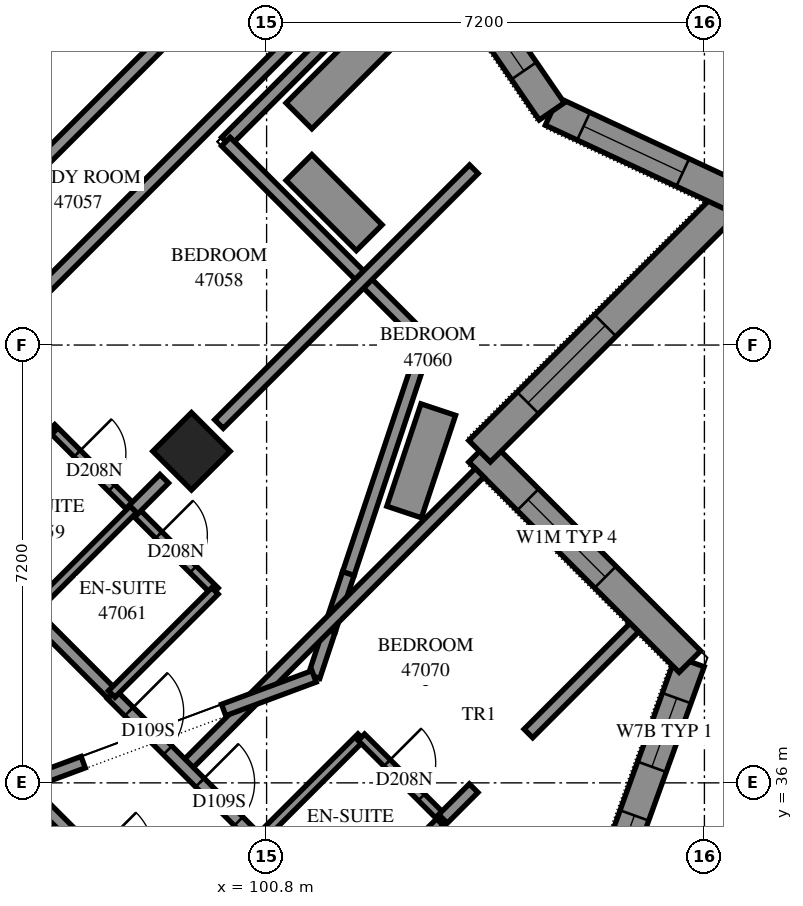
"""IFC4 building model, lengths in metres.
Left out: names, types, materials, properties, quantities, classifications, styles, units other than length and angle.
Written with IfcOpenShell. Run it as: python <this file> out.ifc"""

import sys

from ifc_helpers import new_model, si_unit, direction, frame, frame_2d, origin, origin_2d, place, context, subcontext, project, spatial, polyline, rectangle, outline, extrude, element, fill, save


model = new_model("IFC4")
c1 = context("Model", 3, precision=1e-05, world=origin(), true_north=direction((0.0, 1.0)))
c2 = subcontext(c1, "Body", "Model", "MODEL_VIEW")
j1 = project(units=[si_unit("LENGTHUNIT", "METRE"), si_unit("PLANEANGLEUNIT", "RADIAN")], contexts=[c1])
p1 = place(None, origin())
s1 = spatial("IfcSite", under=j1, at=p1, CompositionType="ELEMENT")
p2 = place(p1, origin())
s2 = spatial("IfcBuilding", under=s1, at=p2, CompositionType="ELEMENT")
p3 = place(p2, frame((0.0, 0.0, 172.8)))
s3 = spatial("IfcBuildingStorey", under=s2, at=p3, CompositionType="ELEMENT", Elevation=172.8)
p4 = place(p3, frame((99.565, 41.453, 0.0), z_axis=(0.0, 0.0, 1.0), x_axis=(0.7071067812, -0.7071067812, 0.0)))
e1 = element("IfcColumn", 1, at=p4, inside=s3, PredefinedType="COLUMN", context=c2, shape_type="SweptSolid", body=[
    extrude(rectangle(XDim=0.9, YDim=0.9, at=origin_2d()), origin(), (0.0, 0.0, 1.0), 3.1),
])
p5 = place(p3, frame((87.049, 38.695, -0.3), z_axis=(0.0, 0.0, 1.0), x_axis=(0.7071067812, 0.7071067812, 0.0)))
e2 = element("IfcWall", 2, at=p5, inside=s3, PredefinedType="SHEAR", context=c2, shape_type="SweptSolid", body=[
    extrude(rectangle(XDim=14.4, YDim=0.6, at=frame_2d((7.2, 0.0))), origin(), (0.0, 0.0, 1.0), 2.7),
])
p6 = place(p5, frame((4.55, 0.0, 0.3)))
e3 = element("IfcOpeningElement", 3, at=p6, cuts=e2, PredefinedType="OPENING", context=c2, shape_type="SweptSolid", body=[
    extrude(rectangle(XDim=1.1, YDim=2.1, at=frame_2d((0.55, 1.05))), frame((0.0, 0.31, 0.0), z_axis=(0.0, -1.0, 0.0), x_axis=(1.0, 0.0, 0.0)), (0.0, 0.0, 1.0), 0.62),
])
p7 = place(p5, frame((11.35, 0.0, 0.3)))
e4 = element("IfcOpeningElement", 4, at=p7, cuts=e2, PredefinedType="OPENING", context=c2, shape_type="SweptSolid", body=[
    extrude(rectangle(XDim=1.1, YDim=2.1, at=frame_2d((0.55, 1.05))), frame((0.0, 0.31, 0.0), z_axis=(0.0, -1.0, 0.0), x_axis=(1.0, 0.0, 0.0)), (0.0, 0.0, 1.0), 0.62),
])
p8 = place(p3, frame((105.939, 32.941, 0.0), z_axis=(0.0, 0.0, 1.0), x_axis=(0.3392592753, 0.9406929064, 0.0)))
e5 = element("IfcWall", 5, at=p8, inside=s3, PredefinedType="SOLIDWALL", context=c2, shape_type="SweptSolid", body=[
    extrude(outline(polyline([(-0.113, -0.25), (5.531, -0.25), (5.213, 0.25), (0.113, 0.25), (-0.113, -0.25)])), origin(), (0.0, 0.0, 1.0), 3.1),
])
p9 = place(p8, frame((0.882, 0.0, 0.7)))
e6 = element("IfcOpeningElement", 6, at=p9, cuts=e5, PredefinedType="OPENING", context=c2, shape_type="SweptSolid", body=[
    extrude(rectangle(XDim=1.8, YDim=2.1, at=frame_2d((0.9, 1.05))), frame((0.0, 0.26, 0.0), z_axis=(0.0, -1.0, 0.0), x_axis=(1.0, 0.0, 0.0)), (0.0, 0.0, 1.0), 0.52),
])
p10 = place(p8, frame((3.533, 0.0, 0.7)))
e7 = element("IfcOpeningElement", 7, at=p10, cuts=e5, PredefinedType="OPENING", context=c2, shape_type="SweptSolid", body=[
    extrude(rectangle(XDim=1.2, YDim=2.1, at=frame_2d((0.6, 1.05))), frame((0.0, 0.26, 0.0), z_axis=(0.0, -1.0, 0.0), x_axis=(1.0, 0.0, 0.0)), (0.0, 0.0, 1.0), 0.52),
])
p11 = place(p3, frame((107.761, 37.994, 0.0), z_axis=(0.0, 0.0, 1.0), x_axis=(-0.7071272252, 0.7070863366, 0.0)))
e8 = element("IfcWall", 8, at=p11, inside=s3, PredefinedType="SOLIDWALL", context=c2, shape_type="SweptSolid", body=[
    extrude(outline(polyline([(-0.159, -0.25), (4.641, -0.25), (5.141, 0.25), (0.159, 0.25), (-0.159, -0.25)])), origin(), (0.0, 0.0, 1.0), 3.1),
])
p12 = place(p11, frame((1.966, 0.0, 0.7)))
e9 = element("IfcOpeningElement", 9, at=p12, cuts=e8, PredefinedType="OPENING", context=c2, shape_type="SweptSolid", body=[
    extrude(rectangle(XDim=1.8, YDim=1.8, at=frame_2d((0.9, 0.9))), frame((0.0, 0.26, 0.0), z_axis=(0.0, -1.0, 0.0), x_axis=(1.0, 0.0, 0.0)), (0.0, 0.0, 1.0), 0.52),
])
p13 = place(p3, frame((104.302, 41.453, 0.0), z_axis=(0.0, 0.0, 1.0), x_axis=(0.7071152225, 0.7070983398, 0.0)))
e10 = element("IfcWall", 10, at=p13, inside=s3, PredefinedType="SOLIDWALL", context=c2, shape_type="SweptSolid", body=[
    extrude(outline(polyline([(0.25, -0.25), (6.28, -0.25), (5.566, 0.25), (-0.25, 0.25), (0.25, -0.25)])), origin(), (0.0, 0.0, 1.0), 3.1),
])
p14 = place(p13, frame((1.125, 0.0, 0.7)))
e11 = element("IfcOpeningElement", 11, at=p14, cuts=e10, PredefinedType="OPENING", context=c2, shape_type="SweptSolid", body=[
    extrude(rectangle(XDim=1.8, YDim=1.8, at=frame_2d((0.9, 0.9))), frame((0.0, 0.26, 0.0), z_axis=(0.0, -1.0, 0.0), x_axis=(1.0, 0.0, 0.0)), (0.0, 0.0, 1.0), 0.52),
])
p15 = place(p3, frame((108.491, 45.641, 0.0), z_axis=(0.0, 0.0, 1.0), x_axis=(-0.9061206526, 0.4230193411, 0.0)))
e12 = element("IfcWall", 12, at=p15, inside=s3, PredefinedType="SOLIDWALL", context=c2, shape_type="SweptSolid", body=[
    extrude(outline(polyline([(-0.357, -0.25), (3.244, -0.25), (3.38, 0.25), (0.357, 0.25), (-0.357, -0.25)])), origin(), (0.0, 0.0, 1.0), 3.1),
])
p16 = place(p15, frame((0.934, 0.0, 0.7)))
e13 = element("IfcOpeningElement", 13, at=p16, cuts=e12, PredefinedType="OPENING", context=c2, shape_type="SweptSolid", body=[
    extrude(rectangle(XDim=1.8, YDim=1.8, at=frame_2d((0.9, 0.9))), frame((0.0, 0.26, 0.0), z_axis=(0.0, -1.0, 0.0), x_axis=(1.0, 0.0, 0.0)), (0.0, 0.0, 1.0), 0.52),
])
p17 = place(p3, frame((105.489, 47.042, 0.0), z_axis=(0.0, 0.0, 1.0), x_axis=(-0.5657493712, 0.8245772547, 0.0)))
e14 = element("IfcWall", 14, at=p17, inside=s3, PredefinedType="SOLIDWALL", context=c2, shape_type="SweptSolid", body=[
    extrude(outline(polyline([(0.068, -0.25), (3.511, -0.25), (3.417, 0.25), (-0.068, 0.25), (0.068, -0.25)])), origin(), (0.0, 0.0, 1.0), 3.1),
])
p18 = place(p17, frame((0.809, 0.0, 0.7)))
e15 = element("IfcOpeningElement", 15, at=p18, cuts=e14, PredefinedType="OPENING", context=c2, shape_type="SweptSolid", body=[
    extrude(rectangle(XDim=1.8, YDim=1.8, at=frame_2d((0.9, 0.9))), frame((0.0, 0.26, 0.0), z_axis=(0.0, -1.0, 0.0), x_axis=(1.0, 0.0, 0.0)), (0.0, 0.0, 1.0), 0.52),
])
p19 = place(p3, frame((103.323, 49.737, 0.0), z_axis=(0.0, 0.0, 1.0), x_axis=(-0.707117854, -0.7070957082, 0.0)))
e16 = element("IfcWall", 16, at=p19, inside=s3, PredefinedType="PARAPET", context=c2, shape_type="SweptSolid", body=[
    extrude(outline(polyline([(0.0, -0.1), (4.615, -0.1), (4.415, 0.1), (0.0, 0.1), (0.0, -0.1)])), origin(), (0.0, 0.0, 1.0), 0.25),
])
p20 = place(p3, frame((100.13, 46.544, 0.0), z_axis=(0.0, 0.0, 1.0), x_axis=(0.7070852627, -0.707128299, 0.0)))
e17 = element("IfcWall", 17, at=p20, inside=s3, PredefinedType="PARAPET", context=c2, shape_type="SweptSolid", body=[
    extrude(outline(polyline([(-0.1, -0.1), (4.585, -0.1), (4.709, 0.1), (0.1, 0.1), (-0.1, -0.1)])), origin(), (0.0, 0.0, 1.0), 0.25),
])
p21 = place(p3, frame((103.416, 43.258, 0.0), z_axis=(0.0, 0.0, 1.0), x_axis=(-0.3160011426, -0.9487588091, 0.0)))
e18 = element("IfcWall", 18, at=p21, inside=s3, PredefinedType="PARAPET", context=c2, shape_type="SweptSolid", body=[
    extrude(outline(polyline([(0.062, -0.1), (0.397, -0.1), (0.397, 0.1), (-0.062, 0.1), (0.062, -0.1)])), origin(), (0.0, 0.0, 1.0), 0.25),
])
p22 = place(p3, frame((103.291, 42.881, 0.0), z_axis=(0.0, 0.0, 1.0), x_axis=(-0.3162443117, -0.9486777827, 0.0)))
e19 = element("IfcWall", 19, at=p22, inside=s3, PredefinedType="PARAPET", context=c2, shape_type="SweptSolid", body=[
    extrude(outline(polyline([(0.0, -0.1), (3.626, -0.1), (3.626, 0.1), (0.0, 0.1), (0.0, -0.1)])), origin(), (0.0, 0.0, 1.0), 0.25),
])
p23 = place(p3, frame((102.144, 39.441, 0.0), z_axis=(0.0, 0.0, 1.0), x_axis=(-0.3161671582, -0.9487034985, 0.0)))
e20 = element("IfcWall", 20, at=p23, inside=s3, PredefinedType="PARAPET", context=c2, shape_type="SweptSolid", body=[
    extrude(outline(polyline([(0.0, -0.1), (0.99, -0.1), (0.99, 0.1), (0.0, 0.1), (0.0, -0.1)])), origin(), (0.0, 0.0, 1.0), 0.25),
])
p24 = place(p3, frame((101.831, 38.502, 0.0), z_axis=(0.0, 0.0, 1.0), x_axis=(-0.3163035263, -0.9486580413, 0.0)))
e21 = element("IfcWall", 21, at=p24, inside=s3, PredefinedType="PARAPET", context=c2, shape_type="SweptSolid", body=[
    extrude(outline(polyline([(0.0, -0.1), (0.744, -0.1), (0.84, 0.1), (0.0, 0.1), (0.0, -0.1)])), origin(), (0.0, 0.0, 1.0), 0.25),
])
p25 = place(p3, frame((101.332, 46.12, 0.0), z_axis=(0.0, 0.0, 1.0), x_axis=(0.7070761738, -0.7071373872, 0.0)))
e22 = element("IfcWall", 22, at=p25, inside=s3, PredefinedType="SOLIDWALL", context=c2, shape_type="SweptSolid", body=[
    extrude(rectangle(XDim=1.634, YDim=0.6, at=frame_2d((0.817, 0.0))), origin(), (0.0, 0.0, 1.0), 0.65),
])
p26 = place(p3, frame((103.623, 42.138, 0.0), z_axis=(0.0, 0.0, 1.0), x_axis=(-0.3162446684, -0.9486776638, 0.0)))
e23 = element("IfcWall", 23, at=p26, inside=s3, PredefinedType="SOLIDWALL", context=c2, shape_type="SweptSolid", body=[
    extrude(rectangle(XDim=1.775, YDim=0.6, at=frame_2d((0.887, 0.0))), origin(), (0.0, 0.0, 1.0), 0.65),
])
p27 = place(p3, frame((94.366, 41.348, 0.0), z_axis=(0.0, 0.0, 1.0), x_axis=(0.7071108825, 0.7071026798, 0.0)))
e24 = element("IfcWall", 24, at=p27, inside=s3, PredefinedType="PARTITIONING", context=c2, shape_type="SweptSolid", body=[
    extrude(rectangle(XDim=12.191, YDim=0.2, at=frame_2d((6.096, 0.0))), origin(), (0.0, 0.0, 1.0), 3.1),
])
p28 = place(p3, frame((91.967, 40.785, 0.0), z_axis=(0.0, 0.0, 1.0), x_axis=(0.7071067812, -0.7071067812, 0.0)))
e25 = element("IfcWall", 25, at=p28, inside=s3, PredefinedType="PARTITIONING", context=c2, shape_type="SweptSolid", body=[
    extrude(rectangle(XDim=12.1, YDim=0.2, at=frame_2d((6.05, 0.0))), origin(), (0.0, 0.0, 1.0), 3.1),
])
p29 = place(p28, frame((3.448, 0.0, 0.0)))
e26 = element("IfcOpeningElement", 26, at=p29, cuts=e25, PredefinedType="OPENING", context=c2, shape_type="SweptSolid", body=[
    extrude(rectangle(XDim=0.9, YDim=2.1, at=frame_2d((0.45, 1.05))), frame((0.0, 0.11, 0.0), z_axis=(0.0, -1.0, 0.0), x_axis=(1.0, 0.0, 0.0)), (0.0, 0.0, 1.0), 0.22),
])
p30 = place(p28, frame((8.457, 0.0, 0.0)))
e27 = element("IfcOpeningElement", 27, at=p30, cuts=e25, PredefinedType="OPENING", context=c2, shape_type="SweptSolid", body=[
    extrude(rectangle(XDim=1.0, YDim=2.1, at=frame_2d((0.5, 1.05))), frame((0.0, 0.11, 0.0), z_axis=(0.0, -1.0, 0.0), x_axis=(1.0, 0.0, 0.0)), (0.0, 0.0, 1.0), 0.22),
])
p31 = place(p3, frame((93.306, 42.408, 0.0), z_axis=(0.0, 0.0, 1.0), x_axis=(0.7071067812, 0.7071067812, 0.0)))
e28 = element("IfcWall", 28, at=p31, inside=s3, PredefinedType="PARTITIONING", context=c2, shape_type="SweptSolid", body=[
    extrude(rectangle(XDim=9.45, YDim=0.2, at=frame_2d((4.725, 0.0))), origin(), (0.0, 0.0, 1.0), 3.1),
])
p32 = place(p31, frame((0.253, 0.0, 0.0)))
e29 = element("IfcOpeningElement", 29, at=p32, cuts=e28, PredefinedType="OPENING", context=c2, shape_type="SweptSolid", body=[
    extrude(rectangle(XDim=1.0, YDim=2.1, at=frame_2d((0.5, 1.05))), frame((0.0, 0.11, 0.0), z_axis=(0.0, -1.0, 0.0), x_axis=(1.0, 0.0, 0.0)), (0.0, 0.0, 1.0), 0.22),
])
p33 = place(p3, frame((99.458, 36.256, 0.0), z_axis=(0.0, 0.0, 1.0), x_axis=(0.7071067812, 0.7071067812, 0.0)))
e30 = element("IfcWall", 30, at=p33, inside=s3, PredefinedType="PARTITIONING", context=c2, shape_type="SweptSolid", body=[
    extrude(rectangle(XDim=6.85, YDim=0.2, at=frame_2d((3.425, 0.0))), origin(), (0.0, 0.0, 1.0), 3.1),
])
p34 = place(p3, frame((100.017, 41.901, 0.0), z_axis=(0.0, 0.0, 1.0), x_axis=(0.7072754814, 0.7069380408, 0.0)))
e31 = element("IfcWall", 31, at=p34, inside=s3, PredefinedType="PARTITIONING", context=c2, shape_type="SweptSolid", body=[
    extrude(rectangle(XDim=5.927, YDim=0.2, at=frame_2d((2.963, 0.0))), origin(), (0.0, 0.0, 1.0), 3.1),
])
p35 = place(p3, frame((98.253, 37.455, 0.0), z_axis=(0.0, 0.0, 1.0), x_axis=(0.7071067812, -0.7071067812, 0.0)))
e32 = element("IfcWall", 32, at=p35, inside=s3, PredefinedType="PARTITIONING", context=c2, shape_type="SweptSolid", body=[
    extrude(rectangle(XDim=5.301, YDim=0.2, at=frame_2d((2.65, 0.0))), origin(), (0.0, 0.0, 1.0), 3.1),
])
p36 = place(p35, frame((0.401, 0.0, 0.0)))
e33 = element("IfcOpeningElement", 33, at=p36, cuts=e32, PredefinedType="OPENING", context=c2, shape_type="SweptSolid", body=[
    extrude(rectangle(XDim=0.9, YDim=2.1, at=frame_2d((0.45, 1.05))), frame((0.0, 0.11, 0.0), z_axis=(0.0, -1.0, 0.0), x_axis=(1.0, 0.0, 0.0)), (0.0, 0.0, 1.0), 0.22),
])
p37 = place(p35, frame((2.05, 0.0, 0.0)))
e34 = element("IfcOpeningElement", 34, at=p37, cuts=e32, PredefinedType="OPENING", context=c2, shape_type="SweptSolid", body=[
    extrude(rectangle(XDim=0.9, YDim=2.1, at=frame_2d((0.45, 1.05))), frame((0.0, 0.11, 0.0), z_axis=(0.0, -1.0, 0.0), x_axis=(1.0, 0.0, 0.0)), (0.0, 0.0, 1.0), 0.22),
])
p38 = place(p3, frame((97.263, 41.839, 0.0), z_axis=(0.0, 0.0, 1.0), x_axis=(0.7071067812, -0.7071067812, 0.0)))
e35 = element("IfcWall", 35, at=p38, inside=s3, PredefinedType="PARTITIONING", context=c2, shape_type="SweptSolid", body=[
    extrude(rectangle(XDim=3.801, YDim=0.15, at=frame_2d((1.901, 0.0))), origin(), (0.0, 0.0, 1.0), 3.1),
])
p39 = place(p38, frame((0.598, 0.0, 0.0)))
e36 = element("IfcOpeningElement", 36, at=p39, cuts=e35, PredefinedType="OPENING", context=c2, shape_type="SweptSolid", body=[
    extrude(rectangle(XDim=0.8, YDim=2.1, at=frame_2d((0.4, 1.05))), frame((0.0, 0.085, 0.0), z_axis=(0.0, -1.0, 0.0), x_axis=(1.0, 0.0, 0.0)), (0.0, 0.0, 1.0), 0.17),
])
p40 = place(p38, frame((2.493, 0.0, 0.0)))
e37 = element("IfcOpeningElement", 37, at=p40, cuts=e35, PredefinedType="OPENING", context=c2, shape_type="SweptSolid", body=[
    extrude(rectangle(XDim=0.8, YDim=2.1, at=frame_2d((0.4, 1.05))), frame((0.0, 0.085, 0.0), z_axis=(0.0, -1.0, 0.0), x_axis=(1.0, 0.0, 0.0)), (0.0, 0.0, 1.0), 0.17),
])
p41 = place(p3, frame((95.573, 40.148, 0.0), z_axis=(0.0, 0.0, 1.0), x_axis=(0.7068698107, -0.7073436723, 0.0)))
e38 = element("IfcWall", 38, at=p41, inside=s3, PredefinedType="PARTITIONING", context=c2, shape_type="SweptSolid", body=[
    extrude(rectangle(XDim=3.799, YDim=0.2, at=frame_2d((1.899, 0.0))), origin(), (0.0, 0.0, 1.0), 3.1),
])
p42 = place(p3, frame((105.105, 36.813, 0.0), z_axis=(0.0, 0.0, 1.0), x_axis=(0.7071067812, 0.7071067812, 0.0)))
e39 = element("IfcWall", 39, at=p42, inside=s3, PredefinedType="PARTITIONING", context=c2, shape_type="SweptSolid", body=[
    extrude(rectangle(XDim=2.463, YDim=0.2, at=frame_2d((1.232, 0.0))), origin(), (0.0, 0.0, 1.0), 3.1),
])
p43 = place(p3, frame((102.003, 33.711, 0.0), z_axis=(0.0, 0.0, 1.0), x_axis=(0.7071067812, 0.7071067812, 0.0)))
e40 = element("IfcWall", 40, at=p43, inside=s3, PredefinedType="PARTITIONING", context=c2, shape_type="SweptSolid", body=[
    extrude(rectangle(XDim=2.401, YDim=0.15, at=frame_2d((1.201, 0.0))), origin(), (0.0, 0.0, 1.0), 3.1),
])
for number, where, z_axis, x_axis in (
    (41, (95.571, 40.143, 0.0), (0.0, 0.0, 1.0), (0.707, 0.708, 0.0)),
    (42, (98.253, 37.461, 0.0), (0.0, 0.0, 1.0), (0.708, 0.707, 0.0)),
    (43, (100.657, 35.057, 0.0), (0.0, 0.0, 1.0), (0.708, 0.707, 0.0)),
):
    element("IfcWall", number, at=place(p3, frame(where, z_axis=z_axis, x_axis=x_axis)), inside=s3, PredefinedType="PARTITIONING", context=c2, shape_type="SweptSolid", body=[
        extrude(rectangle(XDim=2.4, YDim=0.15, at=frame_2d((1.2, 0.0))), origin(), (0.0, 0.0, 1.0), 3.1),
    ])
p44 = place(p3, frame((96.913, 38.803, 0.0), z_axis=(0.0, 0.0, 1.0), x_axis=(0.7071067812, 0.7071067812, 0.0)))
e44 = element("IfcWall", 44, at=p44, inside=s3, PredefinedType="PARTITIONING", context=c2, shape_type="SweptSolid", body=[
    extrude(rectangle(XDim=2.398, YDim=0.15, at=frame_2d((1.199, 0.0))), origin(), (0.0, 0.0, 1.0), 2.6),
])
p45 = place(p3, frame((102.358, 36.75, 0.0), z_axis=(0.0, 0.0, 1.0), x_axis=(0.7076330979, -0.7065800724, 0.0)))
e45 = element("IfcWall", 45, at=p45, inside=s3, PredefinedType="PARTITIONING", context=c2, shape_type="SweptSolid", body=[
    extrude(rectangle(XDim=1.899, YDim=0.15, at=frame_2d((0.95, 0.0))), origin(), (0.0, 0.0, 1.0), 3.1),
])
p46 = place(p45, frame((0.597, 0.0, 0.0)))
e46 = element("IfcOpeningElement", 46, at=p46, cuts=e45, PredefinedType="OPENING", context=c2, shape_type="SweptSolid", body=[
    extrude(rectangle(XDim=0.8, YDim=2.1, at=frame_2d((0.4, 1.05))), frame((0.0, 0.085, 0.0), z_axis=(0.0, -1.0, 0.0), x_axis=(1.0, 0.0, 0.0)), (0.0, 0.0, 1.0), 0.17),
])
p47 = place(p3, frame((98.613, 40.495, 0.0), z_axis=(0.0, 0.0, 1.0), x_axis=(0.7057051861, 0.7085056035, 0.0)))
e47 = element("IfcWall", 47, at=p47, inside=s3, PredefinedType="PARTITIONING", context=c2, shape_type="SweptSolid", body=[
    extrude(rectangle(XDim=0.714, YDim=0.2, at=frame_2d((0.357, 0.0))), origin(), (0.0, 0.0, 1.0), 2.6),
])
p48 = place(p3, frame((103.701, 35.409, 0.0), z_axis=(0.0, 0.0, 1.0), x_axis=(0.7071067812, 0.7071067812, 0.0)))
e48 = element("IfcWall", 48, at=p48, inside=s3, PredefinedType="PARTITIONING", context=c2, shape_type="SweptSolid", body=[
    extrude(rectangle(XDim=0.713, YDim=0.2, at=frame_2d((0.356, 0.0))), origin(), (0.0, 0.0, 1.0), 3.1),
])
p49 = place(p3, frame((101.581, 37.751, 0.0), z_axis=(0.0, 0.0, 1.0), x_axis=(-0.9374282115, -0.3481786155, 0.0)))
e49 = element("IfcWall", 49, at=p49, inside=s3, PredefinedType="PARAPET", context=c2, shape_type="SweptSolid", body=[
    extrude(outline(polyline([(0.048, -0.1), (1.586, -0.1), (1.586, 0.1), (-0.048, 0.1), (0.048, -0.1)])), origin(), (0.0, 0.0, 1.0), 0.25),
])
p50 = place(p3, frame((97.784, 36.34, 0.0), z_axis=(0.0, 0.0, 1.0), x_axis=(-0.9374199992, -0.3482007252, 0.0)))
e50 = element("IfcWall", 50, at=p50, inside=s3, PredefinedType="PARAPET", context=c2, shape_type="SweptSolid", body=[
    extrude(outline(polyline([(0.0, -0.1), (1.284, -0.1), (1.192, 0.1), (0.0, 0.1), (0.0, -0.1)])), origin(), (0.0, 0.0, 1.0), 0.25),
])
p51 = place(p3, frame((102.951, 48.587, 0.0), z_axis=(0.0, 0.0, 1.0), x_axis=(-0.7071067812, -0.7071067812, 0.0)))
e51 = element("IfcWall", 51, at=p51, inside=s3, PredefinedType="SOLIDWALL", context=c2, shape_type="SweptSolid", body=[
    extrude(outline(polyline([(0.0, -0.3), (2.288, -0.3), (2.288, 0.3), (0.0, 0.3), (0.0, -0.3)])), origin(), (0.0, 0.0, 1.0), 0.65),
])
p52 = place(p9, origin())
e52 = element("IfcWindow", 52, at=p52, inside=s3, PartitioningType="SINGLE_PANEL", PredefinedType="WINDOW", context=c2, shape_type="SweptSolid", body=[
    extrude(rectangle(XDim=1.8, YDim=2.1, at=frame_2d((0.9, 1.05))), frame((0.0, 0.18, 0.0), z_axis=(0.0, -1.0, 0.0), x_axis=(1.0, 0.0, 0.0)), (0.0, 0.0, 1.0), 0.06),
])
fill(e6, e52)
p53 = place(p10, origin())
e53 = element("IfcWindow", 53, at=p53, inside=s3, PartitioningType="SINGLE_PANEL", PredefinedType="WINDOW", context=c2, shape_type="SweptSolid", body=[
    extrude(rectangle(XDim=1.2, YDim=2.1, at=frame_2d((0.6, 1.05))), frame((0.0, 0.18, 0.0), z_axis=(0.0, -1.0, 0.0), x_axis=(1.0, 0.0, 0.0)), (0.0, 0.0, 1.0), 0.06),
])
fill(e7, e53)
p54 = place(p12, origin())
e54 = element("IfcWindow", 54, at=p54, inside=s3, PartitioningType="SINGLE_PANEL", PredefinedType="WINDOW", context=c2, shape_type="SweptSolid", body=[
    extrude(rectangle(XDim=1.8, YDim=1.8, at=frame_2d((0.9, 0.9))), frame((0.0, 0.18, 0.0), z_axis=(0.0, -1.0, 0.0), x_axis=(1.0, 0.0, 0.0)), (0.0, 0.0, 1.0), 0.06),
])
fill(e9, e54)
p55 = place(p14, origin())
e55 = element("IfcWindow", 55, at=p55, inside=s3, PartitioningType="SINGLE_PANEL", PredefinedType="WINDOW", context=c2, shape_type="SweptSolid", body=[
    extrude(rectangle(XDim=1.8, YDim=1.8, at=frame_2d((0.9, 0.9))), frame((0.0, 0.18, 0.0), z_axis=(0.0, -1.0, 0.0), x_axis=(1.0, 0.0, 0.0)), (0.0, 0.0, 1.0), 0.06),
])
fill(e11, e55)
p56 = place(p16, origin())
e56 = element("IfcWindow", 56, at=p56, inside=s3, PartitioningType="SINGLE_PANEL", PredefinedType="WINDOW", context=c2, shape_type="SweptSolid", body=[
    extrude(rectangle(XDim=1.8, YDim=1.8, at=frame_2d((0.9, 0.9))), frame((0.0, 0.18, 0.0), z_axis=(0.0, -1.0, 0.0), x_axis=(1.0, 0.0, 0.0)), (0.0, 0.0, 1.0), 0.06),
])
fill(e13, e56)
p57 = place(p18, origin())
e57 = element("IfcWindow", 57, at=p57, inside=s3, PartitioningType="SINGLE_PANEL", PredefinedType="WINDOW", context=c2, shape_type="SweptSolid", body=[
    extrude(rectangle(XDim=1.8, YDim=1.8, at=frame_2d((0.9, 0.9))), frame((0.0, 0.18, 0.0), z_axis=(0.0, -1.0, 0.0), x_axis=(1.0, 0.0, 0.0)), (0.0, 0.0, 1.0), 0.06),
])
fill(e15, e57)
p58 = place(p39, origin())
e58 = element("IfcDoor", 58, at=p58, inside=s3, OperationType="SINGLE_SWING_RIGHT", PredefinedType="DOOR", context=c2, shape_type="SweptSolid", body=[
    extrude(rectangle(XDim=0.8, YDim=2.1, at=frame_2d((0.4, 1.05))), frame((0.0, 0.025, 0.0), z_axis=(0.0, -1.0, 0.0), x_axis=(1.0, 0.0, 0.0)), (0.0, 0.0, 1.0), 0.05),
])
fill(e36, e58)
p59 = place(p36, origin())
e59 = element("IfcDoor", 59, at=p59, inside=s3, OperationType="SINGLE_SWING_LEFT", PredefinedType="DOOR", context=c2, shape_type="SweptSolid", body=[
    extrude(rectangle(XDim=0.9, YDim=2.1, at=frame_2d((0.45, 1.05))), frame((0.0, 0.025, 0.0), z_axis=(0.0, -1.0, 0.0), x_axis=(1.0, 0.0, 0.0)), (0.0, 0.0, 1.0), 0.05),
])
fill(e33, e59)
p60 = place(p40, origin())
e60 = element("IfcDoor", 60, at=p60, inside=s3, OperationType="SINGLE_SWING_RIGHT", PredefinedType="DOOR", context=c2, shape_type="SweptSolid", body=[
    extrude(rectangle(XDim=0.8, YDim=2.1, at=frame_2d((0.4, 1.05))), frame((0.0, 0.025, 0.0), z_axis=(0.0, -1.0, 0.0), x_axis=(1.0, 0.0, 0.0)), (0.0, 0.0, 1.0), 0.05),
])
fill(e37, e60)
p61 = place(p37, origin())
e61 = element("IfcDoor", 61, at=p61, inside=s3, OperationType="SINGLE_SWING_RIGHT", PredefinedType="DOOR", context=c2, shape_type="SweptSolid", body=[
    extrude(rectangle(XDim=0.9, YDim=2.1, at=frame_2d((0.45, 1.05))), frame((0.0, 0.025, 0.0), z_axis=(0.0, -1.0, 0.0), x_axis=(1.0, 0.0, 0.0)), (0.0, 0.0, 1.0), 0.05),
])
fill(e34, e61)
p62 = place(p46, origin())
e62 = element("IfcDoor", 62, at=p62, inside=s3, OperationType="SINGLE_SWING_RIGHT", PredefinedType="DOOR", context=c2, shape_type="SweptSolid", body=[
    extrude(rectangle(XDim=0.8, YDim=2.1, at=frame_2d((0.4, 1.05))), frame((0.0, 0.025, 0.0), z_axis=(0.0, -1.0, 0.0), x_axis=(1.0, 0.0, 0.0)), (0.0, 0.0, 1.0), 0.05),
])
fill(e46, e62)
save(model, sys.argv[1])
